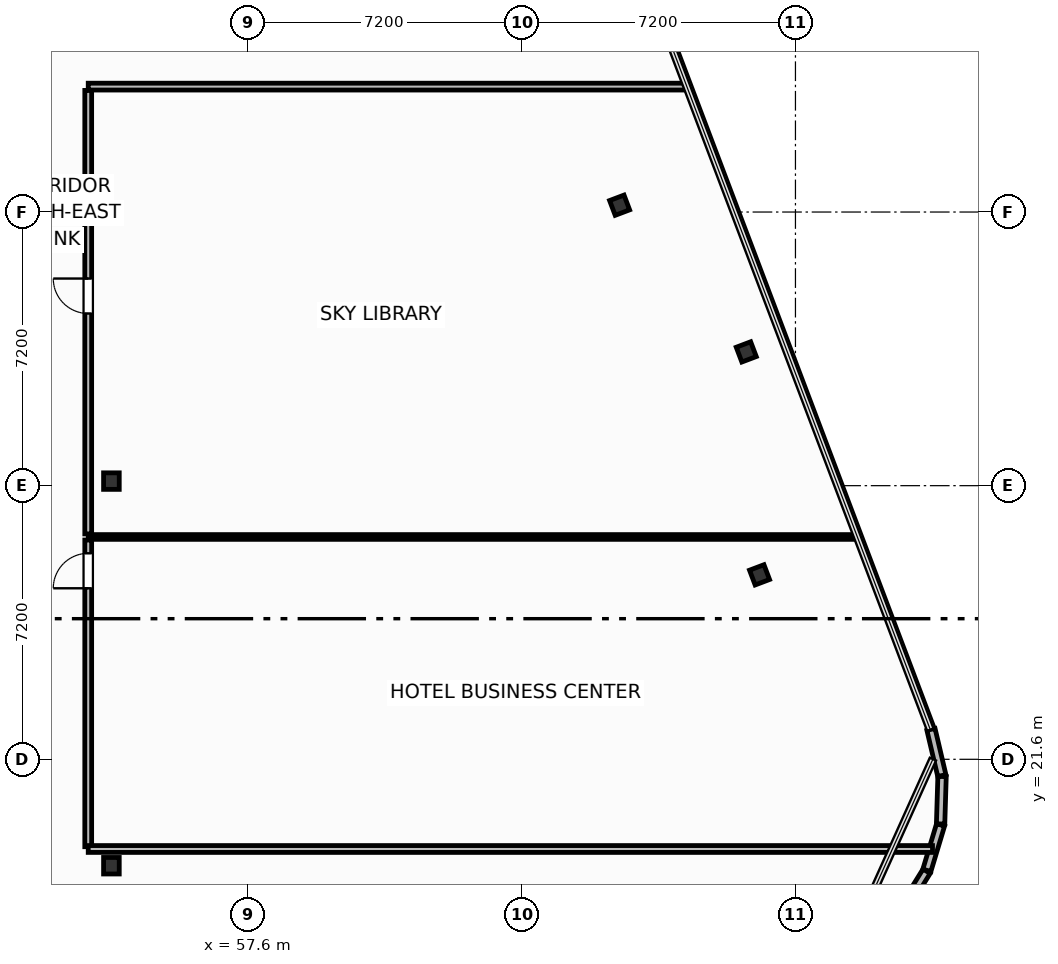
"""IFC4 building model, lengths in metres.
Left out: names, types, materials, properties, quantities, classifications, styles, units other than length and angle.
Written with IfcOpenShell. Run it as: python <this file> out.ifc"""

import sys

from ifc_helpers import new_model, si_unit, direction, frame, frame_2d, origin, origin_2d, place, context, subcontext, project, spatial, rectangle, i_section, extrude, element, fill, save


model = new_model("IFC4")
c1 = context("Model", 3, precision=1e-05, world=origin(), true_north=direction((0.0, 1.0)))
c2 = subcontext(c1, "Body", "Model", "MODEL_VIEW")
j1 = project(units=[si_unit("LENGTHUNIT", "METRE"), si_unit("PLANEANGLEUNIT", "RADIAN")], contexts=[c1])
p1 = place(None, origin())
s1 = spatial("IfcSite", under=j1, at=p1, CompositionType="ELEMENT")
p2 = place(p1, origin())
s2 = spatial("IfcBuilding", under=s1, at=p2, CompositionType="ELEMENT")
p3 = place(p2, frame((0.0, 0.0, 227.5)))
s3 = spatial("IfcBuildingStorey", under=s2, at=p3, CompositionType="ELEMENT", Elevation=227.5)
for number, where, z_axis, x_axis in (
    (1, (54.0, 18.8, 0.0), (0.0, 0.0, 1.0), (1.0, 0.0, 0.0)),
    (2, (54.0, 28.92, 0.0), (0.0, 0.0, 1.0), (1.0, 0.0, 0.0)),
):
    element("IfcColumn", number, at=place(p3, frame(where, z_axis=z_axis, x_axis=x_axis)), inside=s3, PredefinedType="COLUMN", context=c2, shape_type="SweptSolid", body=[
        extrude(i_section(OverallWidth=0.412, OverallDepth=0.435, WebThickness=0.036, FlangeThickness=0.057, FilletRadius=0.025, at=origin_2d()), origin(), (0.0, 0.0, 1.0), 3.7),
    ])
for number, where, z_axis, x_axis in (
    (3, (71.055, 26.453, 0.0), (0.0, 0.0, 1.0), (0.935, 0.354, 0.0)),
    (4, (70.706, 32.32, 0.0), (0.0, 0.0, 1.0), (0.935, 0.354, 0.0)),
    (5, (67.373, 36.18, 0.0), (0.0, 0.0, 1.0), (0.935, 0.354, 0.0)),
):
    element("IfcColumn", number, at=place(p3, frame(where, z_axis=z_axis, x_axis=x_axis)), inside=s3, PredefinedType="COLUMN", context=c2, shape_type="SweptSolid", body=[
        extrude(i_section(OverallWidth=0.406, OverallDepth=0.416, WebThickness=0.03, FlangeThickness=0.048, FilletRadius=0.025, at=origin_2d()), origin(), (0.0, 0.0, 1.0), 3.7),
    ])
for number, where, z_axis, x_axis in (
    (6, (74.794, 17.593, 0.0), (0.0, 0.0, 1.0), (0.527, 0.85, 0.0)),
    (7, (75.458, 18.679, 0.0), (0.0, 0.0, 1.0), (0.288, 0.958, 0.0)),
):
    element("IfcWall", number, at=place(p3, frame(where, z_axis=z_axis, x_axis=x_axis)), inside=s3, PredefinedType="SOLIDWALL", context=c2, shape_type="SweptSolid", body=[
        extrude(rectangle(XDim=1.249, YDim=0.22, at=frame_2d((0.624, 0.0))), origin(), (0.0, 0.0, 1.0), 2.73),
    ])
p4 = place(p3, frame((75.819, 19.899, 0.0), z_axis=(0.0, 0.0, 1.0), x_axis=(0.030898954628, 0.999522513305, 0.0)))
e8 = element("IfcWall", 8, at=p4, inside=s3, PredefinedType="SOLIDWALL", context=c2, shape_type="SweptSolid", body=[
    extrude(rectangle(XDim=1.248, YDim=0.22, at=frame_2d((0.624, 0.0))), origin(), (0.0, 0.0, 1.0), 2.73),
])
p5 = place(p3, frame((75.852, 21.172, 0.0), z_axis=(0.0, 0.0, 1.0), x_axis=(-0.228941257463, 0.973440239887, 0.0)))
e9 = element("IfcWall", 9, at=p5, inside=s3, PredefinedType="SOLIDWALL", context=c2, shape_type="SweptSolid", body=[
    extrude(rectangle(XDim=1.249, YDim=0.22, at=frame_2d((0.625, 0.0))), origin(), (0.0, 0.0, 1.0), 2.73),
])
p6 = place(p3, frame((53.39, 19.3, 0.0), z_axis=(0.0, 0.0, 1.0), x_axis=(0.0, 1.0, 0.0)))
e10 = element("IfcWall", 10, at=p6, inside=s3, PredefinedType="PARTITIONING", context=c2, shape_type="SweptSolid", body=[
    extrude(rectangle(XDim=8.07, YDim=0.18, at=frame_2d((4.035, 0.0))), origin(), (0.0, 0.0, 1.0), 3.45),
])
p7 = place(p6, frame((6.8, 0.0, 0.0)))
e11 = element("IfcOpeningElement", 11, at=p7, cuts=e10, PredefinedType="OPENING", context=c2, shape_type="SweptSolid", body=[
    extrude(rectangle(XDim=0.92, YDim=2.05, at=frame_2d((0.46, 1.025))), frame((0.0, 0.1, 0.0), z_axis=(0.0, -1.0, 0.0), x_axis=(1.0, 0.0, 0.0)), (0.0, 0.0, 1.0), 0.2),
])
p8 = place(p3, frame((53.39, 27.53, 0.0), z_axis=(0.0, 0.0, 1.0), x_axis=(0.0, 1.0, 0.0)))
e12 = element("IfcWall", 12, at=p8, inside=s3, PredefinedType="PARTITIONING", context=c2, shape_type="SweptSolid", body=[
    extrude(rectangle(XDim=11.67, YDim=0.18, at=frame_2d((5.835, 0.0))), origin(), (0.0, 0.0, 1.0), 3.45),
])
p9 = place(p8, frame((5.8, 0.0, 0.0)))
e13 = element("IfcOpeningElement", 13, at=p9, cuts=e12, PredefinedType="OPENING", context=c2, shape_type="SweptSolid", body=[
    extrude(rectangle(XDim=0.92, YDim=2.05, at=frame_2d((0.46, 1.025))), frame((0.0, 0.1, 0.0), z_axis=(0.0, -1.0, 0.0), x_axis=(1.0, 0.0, 0.0)), (0.0, 0.0, 1.0), 0.2),
])
p10 = place(p3, frame((53.39, 27.45, 0.0), z_axis=(0.0, 0.0, 1.0), x_axis=(1.0, 0.0, 0.0)))
e14 = element("IfcWall", 14, at=p10, inside=s3, PredefinedType="PARTITIONING", context=c2, shape_type="SweptSolid", body=[
    extrude(rectangle(XDim=20.199, YDim=0.125, at=frame_2d((10.1, 0.0))), origin(), (0.0, 0.0, 1.0), 2.739),
])
p11 = place(p3, frame((53.39, 19.24, 0.0), z_axis=(0.0, 0.0, 1.0), x_axis=(1.0, 0.0, 0.0)))
e15 = element("IfcWall", 15, at=p11, inside=s3, PredefinedType="PARTITIONING", context=c2, shape_type="SweptSolid", body=[
    extrude(rectangle(XDim=22.217, YDim=0.18, at=frame_2d((11.108, 0.0))), origin(), (0.0, 0.0, 1.0), 3.45),
])
p12 = place(p3, frame((53.39, 39.3, 0.0), z_axis=(0.0, 0.0, 1.0), x_axis=(1.0, 0.0, 0.0)))
e16 = element("IfcWall", 16, at=p12, inside=s3, PredefinedType="PARTITIONING", context=c2, shape_type="SweptSolid", body=[
    extrude(rectangle(XDim=15.713, YDim=0.18, at=frame_2d((7.856, 0.0))), origin(), (0.0, 0.0, 1.0), 3.45),
])
p13 = place(p7, origin())
e17 = element("IfcDoor", 17, at=p13, inside=s3, OperationType="SINGLE_SWING_LEFT", PredefinedType="DOOR", context=c2, shape_type="SweptSolid", body=[
    extrude(rectangle(XDim=0.92, YDim=2.05, at=frame_2d((0.46, 1.025))), frame((0.0, 0.025, 0.0), z_axis=(0.0, -1.0, 0.0), x_axis=(1.0, 0.0, 0.0)), (0.0, 0.0, 1.0), 0.05),
])
fill(e11, e17)
p14 = place(p9, origin())
e18 = element("IfcDoor", 18, at=p14, inside=s3, OperationType="SINGLE_SWING_RIGHT", PredefinedType="DOOR", context=c2, shape_type="SweptSolid", body=[
    extrude(rectangle(XDim=0.92, YDim=2.05, at=frame_2d((0.46, 1.025))), frame((0.0, 0.025, 0.0), z_axis=(0.0, -1.0, 0.0), x_axis=(1.0, 0.0, 0.0)), (0.0, 0.0, 1.0), 0.05),
])
fill(e13, e18)
save(model, sys.argv[1])
